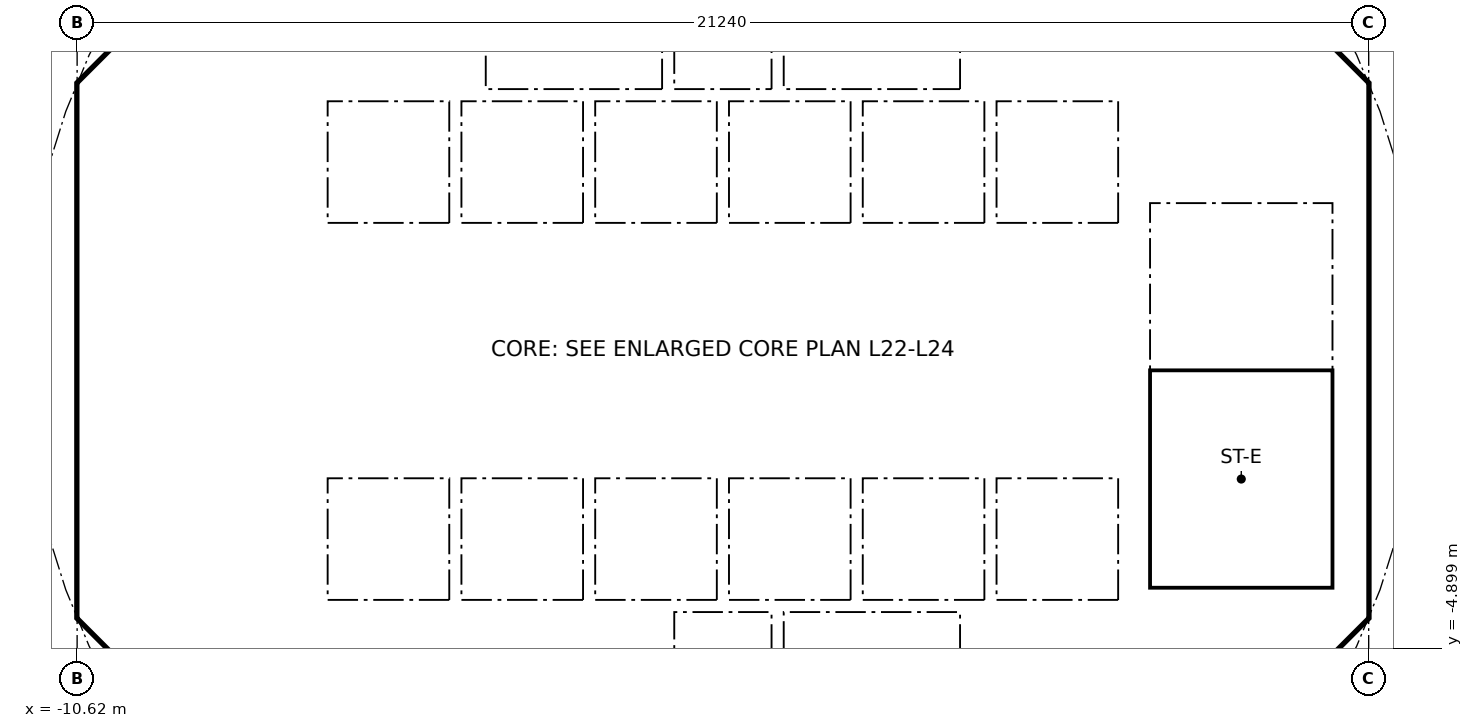
"""IFC4 building model, lengths in metres.
Left out: names, types, materials, properties, quantities, classifications, styles, units other than length and angle.
Written with IfcOpenShell. Run it as: python <this file> out.ifc"""

import sys

from ifc_helpers import new_model, si_unit, direction, frame, frame_2d, origin, place, context, subcontext, project, spatial, polyline, rectangle, outline, extrude, element, fill, save


model = new_model("IFC4")
c1 = context("Model", 3, precision=1e-05, world=origin(), true_north=direction((0.0, 1.0)))
c2 = subcontext(c1, "Body", "Model", "MODEL_VIEW")
j1 = project(units=[si_unit("LENGTHUNIT", "METRE"), si_unit("PLANEANGLEUNIT", "RADIAN")], contexts=[c1])
p1 = place(None, origin())
s1 = spatial("IfcSite", under=j1, at=p1, CompositionType="ELEMENT")
p2 = place(p1, origin())
s2 = spatial("IfcBuilding", under=s1, at=p2, CompositionType="ELEMENT")
p3 = place(p2, frame((0.0, 0.0, 91.8)))
s3 = spatial("IfcBuildingStorey", under=s2, at=p3, CompositionType="ELEMENT", Elevation=91.8)
p4 = place(p3, frame((9.988, 4.613, 0.0), z_axis=(0.0, 0.0, 1.0), x_axis=(-0.707106781187, 0.707106781187, 0.0)))
e1 = element("IfcWall", 1, at=p4, inside=s3, PredefinedType="SHEAR", context=c2, shape_type="SweptSolid", body=[
    extrude(rectangle(XDim=7.602, YDim=0.6, at=frame_2d((3.801, 0.0))), origin(), (0.0, 0.0, 1.0), 3.44),
])
p5 = place(p4, frame((3.201, 0.0, 0.0)))
e2 = element("IfcOpeningElement", 2, at=p5, cuts=e1, PredefinedType="OPENING", context=c2, shape_type="SweptSolid", body=[
    extrude(rectangle(XDim=1.2, YDim=2.1, at=frame_2d((0.6, 1.05))), frame((0.0, 0.31, 0.0), z_axis=(0.0, -1.0, 0.0), x_axis=(1.0, 0.0, 0.0)), (0.0, 0.0, 1.0), 0.62),
])
p6 = place(p3, frame((-4.613, 9.988, 0.0), z_axis=(0.0, 0.0, 1.0), x_axis=(-0.707106781187, -0.707106781187, 0.0)))
e3 = element("IfcWall", 3, at=p6, inside=s3, PredefinedType="SHEAR", context=c2, shape_type="SweptSolid", body=[
    extrude(rectangle(XDim=7.602, YDim=0.6, at=frame_2d((3.801, 0.0))), origin(), (0.0, 0.0, 1.0), 3.44),
])
p7 = place(p6, frame((0.351, 0.0, 0.0)))
e4 = element("IfcOpeningElement", 4, at=p7, cuts=e3, PredefinedType="OPENING", context=c2, shape_type="SweptSolid", body=[
    extrude(rectangle(XDim=1.1, YDim=2.1, at=frame_2d((0.55, 1.05))), frame((0.0, 0.31, 0.0), z_axis=(0.0, -1.0, 0.0), x_axis=(1.0, 0.0, 0.0)), (0.0, 0.0, 1.0), 0.62),
])
p8 = place(p3, frame((-10.325, 3.801, 0.0), z_axis=(0.0, 0.0, 1.0), x_axis=(0.0, -1.0, 0.0)))
e5 = element("IfcWall", 5, at=p8, inside=s3, PredefinedType="SHEAR", context=c2, shape_type="SweptSolid", body=[
    extrude(rectangle(XDim=7.602, YDim=0.6, at=frame_2d((3.801, 0.0))), origin(), (0.0, 0.0, 1.0), 3.44),
])
p9 = place(p8, frame((0.651, 0.0, 0.0)))
e6 = element("IfcOpeningElement", 6, at=p9, cuts=e5, PredefinedType="OPENING", context=c2, shape_type="SweptSolid", body=[
    extrude(rectangle(XDim=1.5, YDim=2.1, at=frame_2d((0.75, 1.05))), frame((0.0, 0.31, 0.0), z_axis=(0.0, -1.0, 0.0), x_axis=(1.0, 0.0, 0.0)), (0.0, 0.0, 1.0), 0.62),
])
p10 = place(p8, frame((5.451, 0.0, 0.0)))
e7 = element("IfcOpeningElement", 7, at=p10, cuts=e5, PredefinedType="OPENING", context=c2, shape_type="SweptSolid", body=[
    extrude(rectangle(XDim=1.5, YDim=2.1, at=frame_2d((0.75, 1.05))), frame((0.0, 0.31, 0.0), z_axis=(0.0, -1.0, 0.0), x_axis=(1.0, 0.0, 0.0)), (0.0, 0.0, 1.0), 0.62),
])
p11 = place(p3, frame((-9.988, -4.613, 0.0), z_axis=(0.0, 0.0, 1.0), x_axis=(0.707106781187, -0.707106781187, 0.0)))
e8 = element("IfcWall", 8, at=p11, inside=s3, PredefinedType="SHEAR", context=c2, shape_type="SweptSolid", body=[
    extrude(rectangle(XDim=7.602, YDim=0.6, at=frame_2d((3.801, 0.0))), origin(), (0.0, 0.0, 1.0), 3.44),
])
p12 = place(p11, frame((6.151, 0.0, 0.0)))
e9 = element("IfcOpeningElement", 9, at=p12, cuts=e8, PredefinedType="OPENING", context=c2, shape_type="SweptSolid", body=[
    extrude(rectangle(XDim=1.1, YDim=2.1, at=frame_2d((0.55, 1.05))), frame((0.0, 0.31, 0.0), z_axis=(0.0, -1.0, 0.0), x_axis=(1.0, 0.0, 0.0)), (0.0, 0.0, 1.0), 0.62),
])
p13 = place(p3, frame((4.613, -9.988, 0.0), z_axis=(0.0, 0.0, 1.0), x_axis=(0.707106781187, 0.707106781187, 0.0)))
e10 = element("IfcWall", 10, at=p13, inside=s3, PredefinedType="SHEAR", context=c2, shape_type="SweptSolid", body=[
    extrude(rectangle(XDim=7.602, YDim=0.6, at=frame_2d((3.801, 0.0))), origin(), (0.0, 0.0, 1.0), 3.44),
])
p14 = place(p13, frame((3.201, 0.0, 0.0)))
e11 = element("IfcOpeningElement", 11, at=p14, cuts=e10, PredefinedType="OPENING", context=c2, shape_type="SweptSolid", body=[
    extrude(rectangle(XDim=1.2, YDim=2.1, at=frame_2d((0.6, 1.05))), frame((0.0, 0.31, 0.0), z_axis=(0.0, -1.0, 0.0), x_axis=(1.0, 0.0, 0.0)), (0.0, 0.0, 1.0), 0.62),
])
p15 = place(p3, frame((-7.0, 4.1, 0.0), z_axis=(0.0, 0.0, 1.0), x_axis=(0.0, 1.0, 0.0)))
e12 = element("IfcWall", 12, at=p15, inside=s3, PredefinedType="PARTITIONING", context=c2, shape_type="SweptSolid", body=[
    extrude(rectangle(XDim=2.927, YDim=0.15, at=frame_2d((1.463, 0.0))), origin(), (0.0, 0.0, 1.0), 3.44),
])
p16 = place(p15, frame((1.051, 0.0, 0.0)))
e13 = element("IfcOpeningElement", 13, at=p16, cuts=e12, PredefinedType="OPENING", context=c2, shape_type="SweptSolid", body=[
    extrude(rectangle(XDim=0.9, YDim=2.1, at=frame_2d((0.45, 1.05))), frame((0.0, 0.085, 0.0), z_axis=(0.0, -1.0, 0.0), x_axis=(1.0, 0.0, 0.0)), (0.0, 0.0, 1.0), 0.17),
])
p17 = place(p3, frame((4.0, 4.3, 0.0), z_axis=(0.0, 0.0, 1.0), x_axis=(0.0, 1.0, 0.0)))
e14 = element("IfcWall", 14, at=p17, inside=s3, PredefinedType="SOLIDWALL", context=c2, shape_type="SweptSolid", body=[
    extrude(rectangle(XDim=2.2, YDim=0.2, at=frame_2d((1.1, 0.0))), origin(), (0.0, 0.0, 1.0), 3.44),
])
p18 = place(p17, frame((0.55, 0.0, 0.0)))
e15 = element("IfcOpeningElement", 15, at=p18, cuts=e14, PredefinedType="OPENING", context=c2, shape_type="SweptSolid", body=[
    extrude(rectangle(XDim=1.1, YDim=2.1, at=frame_2d((0.55, 1.05))), frame((0.0, 0.11, 0.0), z_axis=(0.0, -1.0, 0.0), x_axis=(1.0, 0.0, 0.0)), (0.0, 0.0, 1.0), 0.22),
])
p19 = place(p3, frame((-4.0, 4.3, 0.0), z_axis=(0.0, 0.0, 1.0), x_axis=(0.0, 1.0, 0.0)))
e16 = element("IfcWall", 16, at=p19, inside=s3, PredefinedType="SOLIDWALL", context=c2, shape_type="SweptSolid", body=[
    extrude(rectangle(XDim=2.2, YDim=0.2, at=frame_2d((1.1, 0.0))), origin(), (0.0, 0.0, 1.0), 3.44),
])
p20 = place(p19, frame((0.55, 0.0, 0.0)))
e17 = element("IfcOpeningElement", 17, at=p20, cuts=e16, PredefinedType="OPENING", context=c2, shape_type="SweptSolid", body=[
    extrude(rectangle(XDim=1.1, YDim=2.1, at=frame_2d((0.55, 1.05))), frame((0.0, 0.11, 0.0), z_axis=(0.0, -1.0, 0.0), x_axis=(1.0, 0.0, 0.0)), (0.0, 0.0, 1.0), 0.22),
])
p21 = place(p3, frame((-6.7, 2.0, 0.0), z_axis=(0.0, 0.0, 1.0), x_axis=(1.0, 0.0, 0.0)))
e18 = element("IfcWall", 18, at=p21, inside=s3, PredefinedType="SOLIDWALL", context=c2, shape_type="SweptSolid", body=[
    extrude(rectangle(XDim=13.4, YDim=0.2, at=frame_2d((6.7, 0.0))), origin(), (0.0, 0.0, 1.0), 3.44),
])
p22 = place(p21, frame((0.65, 0.0, 0.0)))
e19 = element("IfcOpeningElement", 19, at=p22, cuts=e18, PredefinedType="OPENING", context=c2, shape_type="SweptSolid", body=[
    extrude(rectangle(XDim=1.1, YDim=2.1, at=frame_2d((0.55, 1.05))), frame((0.0, 0.11, 0.0), z_axis=(0.0, -1.0, 0.0), x_axis=(1.0, 0.0, 0.0)), (0.0, 0.0, 1.0), 0.22),
])
p23 = place(p21, frame((2.85, 0.0, 0.0)))
e20 = element("IfcOpeningElement", 20, at=p23, cuts=e18, PredefinedType="OPENING", context=c2, shape_type="SweptSolid", body=[
    extrude(rectangle(XDim=1.1, YDim=2.1, at=frame_2d((0.55, 1.05))), frame((0.0, 0.11, 0.0), z_axis=(0.0, -1.0, 0.0), x_axis=(1.0, 0.0, 0.0)), (0.0, 0.0, 1.0), 0.22),
])
p24 = place(p21, frame((5.05, 0.0, 0.0)))
e21 = element("IfcOpeningElement", 21, at=p24, cuts=e18, PredefinedType="OPENING", context=c2, shape_type="SweptSolid", body=[
    extrude(rectangle(XDim=1.1, YDim=2.1, at=frame_2d((0.55, 1.05))), frame((0.0, 0.11, 0.0), z_axis=(0.0, -1.0, 0.0), x_axis=(1.0, 0.0, 0.0)), (0.0, 0.0, 1.0), 0.22),
])
p25 = place(p3, frame((6.7, 4.0, 0.0), z_axis=(0.0, 0.0, 1.0), x_axis=(1.0, 0.0, 0.0)))
e22 = element("IfcWall", 22, at=p25, inside=s3, PredefinedType="SOLIDWALL", context=c2, shape_type="SweptSolid", body=[
    extrude(rectangle(XDim=3.325, YDim=0.2, at=frame_2d((1.662, 0.0))), origin(), (0.0, 0.0, 1.0), 3.44),
])
p26 = place(p25, frame((1.25, 0.0, 0.0)))
e23 = element("IfcOpeningElement", 23, at=p26, cuts=e22, PredefinedType="OPENING", context=c2, shape_type="SweptSolid", body=[
    extrude(rectangle(XDim=1.1, YDim=2.1, at=frame_2d((0.55, 1.05))), frame((0.0, 0.11, 0.0), z_axis=(0.0, -1.0, 0.0), x_axis=(1.0, 0.0, 0.0)), (0.0, 0.0, 1.0), 0.22),
])
p27 = place(p3, frame((-7.4, -6.627, 0.0), z_axis=(0.0, 0.0, 1.0), x_axis=(0.0, 1.0, 0.0)))
e24 = element("IfcWall", 24, at=p27, inside=s3, PredefinedType="PARTITIONING", context=c2, shape_type="SweptSolid", body=[
    extrude(rectangle(XDim=2.527, YDim=0.15, at=frame_2d((1.263, 0.0))), origin(), (0.0, 0.0, 1.0), 3.44),
])
p28 = place(p27, frame((0.776, 0.0, 0.0)))
e25 = element("IfcOpeningElement", 25, at=p28, cuts=e24, PredefinedType="OPENING", context=c2, shape_type="SweptSolid", body=[
    extrude(rectangle(XDim=0.9, YDim=2.1, at=frame_2d((0.45, 1.05))), frame((0.0, 0.085, 0.0), z_axis=(0.0, -1.0, 0.0), x_axis=(1.0, 0.0, 0.0)), (0.0, 0.0, 1.0), 0.17),
])
p29 = place(p3, frame((4.0, -6.5, 0.0), z_axis=(0.0, 0.0, 1.0), x_axis=(0.0, 1.0, 0.0)))
e26 = element("IfcWall", 26, at=p29, inside=s3, PredefinedType="SOLIDWALL", context=c2, shape_type="SweptSolid", body=[
    extrude(rectangle(XDim=2.2, YDim=0.2, at=frame_2d((1.1, 0.0))), origin(), (0.0, 0.0, 1.0), 3.44),
])
p30 = place(p29, frame((0.55, 0.0, 0.0)))
e27 = element("IfcOpeningElement", 27, at=p30, cuts=e26, PredefinedType="OPENING", context=c2, shape_type="SweptSolid", body=[
    extrude(rectangle(XDim=1.1, YDim=2.1, at=frame_2d((0.55, 1.05))), frame((0.0, 0.11, 0.0), z_axis=(0.0, -1.0, 0.0), x_axis=(1.0, 0.0, 0.0)), (0.0, 0.0, 1.0), 0.22),
])
p31 = place(p3, frame((-4.0, -6.5, 0.0), z_axis=(0.0, 0.0, 1.0), x_axis=(0.0, 1.0, 0.0)))
e28 = element("IfcWall", 28, at=p31, inside=s3, PredefinedType="SOLIDWALL", context=c2, shape_type="SweptSolid", body=[
    extrude(rectangle(XDim=2.2, YDim=0.2, at=frame_2d((1.1, 0.0))), origin(), (0.0, 0.0, 1.0), 3.44),
])
p32 = place(p31, frame((0.65, 0.0, 0.0)))
e29 = element("IfcOpeningElement", 29, at=p32, cuts=e28, PredefinedType="OPENING", context=c2, shape_type="SweptSolid", body=[
    extrude(rectangle(XDim=0.9, YDim=2.1, at=frame_2d((0.45, 1.05))), frame((0.0, 0.11, 0.0), z_axis=(0.0, -1.0, 0.0), x_axis=(1.0, 0.0, 0.0)), (0.0, 0.0, 1.0), 0.22),
])
p33 = place(p3, frame((-6.7, -2.0, 0.0), z_axis=(0.0, 0.0, 1.0), x_axis=(1.0, 0.0, 0.0)))
e30 = element("IfcWall", 30, at=p33, inside=s3, PredefinedType="SOLIDWALL", context=c2, shape_type="SweptSolid", body=[
    extrude(rectangle(XDim=13.4, YDim=0.2, at=frame_2d((6.7, 0.0))), origin(), (0.0, 0.0, 1.0), 3.44),
])
p34 = place(p33, frame((0.65, 0.0, 0.0)))
e31 = element("IfcOpeningElement", 31, at=p34, cuts=e30, PredefinedType="OPENING", context=c2, shape_type="SweptSolid", body=[
    extrude(rectangle(XDim=1.1, YDim=2.1, at=frame_2d((0.55, 1.05))), frame((0.0, 0.11, 0.0), z_axis=(0.0, -1.0, 0.0), x_axis=(1.0, 0.0, 0.0)), (0.0, 0.0, 1.0), 0.22),
])
p35 = place(p33, frame((2.85, 0.0, 0.0)))
e32 = element("IfcOpeningElement", 32, at=p35, cuts=e30, PredefinedType="OPENING", context=c2, shape_type="SweptSolid", body=[
    extrude(rectangle(XDim=1.1, YDim=2.1, at=frame_2d((0.55, 1.05))), frame((0.0, 0.11, 0.0), z_axis=(0.0, -1.0, 0.0), x_axis=(1.0, 0.0, 0.0)), (0.0, 0.0, 1.0), 0.22),
])
p36 = place(p3, origin())
e33 = element("IfcWall", 33, at=p36, inside=s3, PredefinedType="SHEAR", context=c2, shape_type="SweptSolid", body=[
    extrude(outline(polyline([(-10.625, -3.801), (-10.025, -3.801), (-10.025, -4.152), (-9.776, -4.401), (-10.2, -4.825), (-10.625, -4.401), (-10.625, -3.801)])), origin(), (0.0, 0.0, 1.0), 3.44),
])
p37 = place(p3, origin())
e34 = element("IfcWall", 34, at=p37, inside=s3, PredefinedType="SHEAR", context=c2, shape_type="SweptSolid", body=[
    extrude(outline(polyline([(-10.2, 4.825), (-9.776, 4.401), (-10.025, 4.152), (-10.025, 3.801), (-10.625, 3.801), (-10.625, 4.401), (-10.2, 4.825)])), origin(), (0.0, 0.0, 1.0), 3.44),
])
p38 = place(p3, origin())
e35 = element("IfcWall", 35, at=p38, inside=s3, PredefinedType="SHEAR", context=c2, shape_type="SweptSolid", body=[
    extrude(outline(polyline([(9.776, -4.401), (10.025, -4.152), (10.025, -3.801), (10.025, 4.152), (9.776, 4.401), (10.2, 4.825), (10.625, 4.401), (10.625, -4.401), (10.2, -4.825), (9.776, -4.401)])), origin(), (0.0, 0.0, 1.0), 3.44),
])
for number, where, z_axis, x_axis in (
    (36, (-0.9, -6.5, 0.0), (0.0, 0.0, 1.0), (0.0, 1.0, 0.0)),
    (37, (0.9, -6.5, 0.0), (0.0, 0.0, 1.0), (0.0, 1.0, 0.0)),
):
    element("IfcWall", number, at=place(p3, frame(where, z_axis=z_axis, x_axis=x_axis)), inside=s3, PredefinedType="SOLIDWALL", context=c2, shape_type="SweptSolid", body=[
        extrude(rectangle(XDim=2.2, YDim=0.2, at=frame_2d((1.1, 0.0))), origin(), (0.0, 0.0, 1.0), 3.44),
    ])
p39 = place(p3, origin())
e38 = element("IfcWall", 38, at=p39, inside=s3, PredefinedType="SOLIDWALL", context=c2, shape_type="SweptSolid", body=[
    extrude(outline(polyline([(-6.7, -2.1), (-6.5, -2.1), (-6.5, -4.1), (-4.5, -4.1), (-4.5, -2.1), (-4.3, -2.1), (-4.3, -4.1), (-2.3, -4.1), (-2.3, -2.1), (-2.1, -2.1), (-2.1, -4.1), (-0.1, -4.1), (-0.1, -2.1), (0.1, -2.1), (0.1, -4.1), (2.1, -4.1), (2.1, -2.1), (2.3, -2.1), (2.3, -4.1), (4.3, -4.1), (4.3, -2.1), (4.5, -2.1), (4.5, -4.1), (6.5, -4.1), (6.5, -2.1), (6.7, -2.1), (6.7, -4.3), (-6.7, -4.3), (-6.7, -2.1)])), origin(), (0.0, 0.0, 1.0), 3.44),
])
for number, where, z_axis, x_axis in (
    (39, (-0.9, 4.3, 0.0), (0.0, 0.0, 1.0), (0.0, 1.0, 0.0)),
    (40, (0.9, 4.3, 0.0), (0.0, 0.0, 1.0), (0.0, 1.0, 0.0)),
):
    element("IfcWall", number, at=place(p3, frame(where, z_axis=z_axis, x_axis=x_axis)), inside=s3, PredefinedType="SOLIDWALL", context=c2, shape_type="SweptSolid", body=[
        extrude(rectangle(XDim=2.2, YDim=0.2, at=frame_2d((1.1, 0.0))), origin(), (0.0, 0.0, 1.0), 3.44),
    ])
p40 = place(p3, origin())
e41 = element("IfcWall", 41, at=p40, inside=s3, PredefinedType="SOLIDWALL", context=c2, shape_type="SweptSolid", body=[
    extrude(outline(polyline([(-6.5, 2.1), (-6.7, 2.1), (-6.7, 4.3), (6.7, 4.3), (6.7, 2.1), (6.5, 2.1), (6.5, 4.1), (4.5, 4.1), (4.5, 2.1), (4.3, 2.1), (4.3, 4.1), (2.3, 4.1), (2.3, 2.1), (2.1, 2.1), (2.1, 4.1), (0.1, 4.1), (0.1, 2.1), (-0.1, 2.1), (-0.1, 4.1), (-2.1, 4.1), (-2.1, 2.1), (-2.3, 2.1), (-2.3, 4.1), (-4.3, 4.1), (-4.3, 2.1), (-4.5, 2.1), (-4.5, 4.1), (-6.5, 4.1), (-6.5, 2.1)])), origin(), (0.0, 0.0, 1.0), 3.44),
])
for number, where, z_axis, x_axis in (
    (42, (-10.025, -4.0, 0.0), (0.0, 0.0, 1.0), (1.0, 0.0, 0.0)),
    (43, (-10.025, 4.0, 0.0), (0.0, 0.0, 1.0), (1.0, 0.0, 0.0)),
):
    element("IfcWall", number, at=place(p3, frame(where, z_axis=z_axis, x_axis=x_axis)), inside=s3, PredefinedType="PARTITIONING", context=c2, shape_type="SweptSolid", body=[
        extrude(rectangle(XDim=3.325, YDim=0.2, at=frame_2d((1.662, 0.0))), origin(), (0.0, 0.0, 1.0), 3.44),
    ])
p41 = place(p3, origin())
e44 = element("IfcWall", 44, at=p41, inside=s3, PredefinedType="SOLIDWALL", context=c2, shape_type="SweptSolid", body=[
    extrude(outline(polyline([(7.025, -3.9), (6.7, -3.9), (6.7, 3.9), (7.025, 3.9), (7.025, -3.9)])), origin(), (0.0, 0.0, 1.0), 3.44),
])
p42 = place(p3, origin())
e45 = element("IfcWall", 45, at=p42, inside=s3, PredefinedType="SOLIDWALL", context=c2, shape_type="SweptSolid", body=[
    extrude(outline(polyline([(10.025, -4.1), (6.7, -4.1), (6.7, -3.9), (10.025, -3.9), (10.025, -4.1)])), origin(), (0.0, 0.0, 1.0), 3.44),
])
p43 = place(p22, origin())
e46 = element("IfcDoor", 46, at=p43, inside=s3, OperationType="DOUBLE_DOOR_SLIDING", PredefinedType="DOOR", context=c2, shape_type="SweptSolid", body=[
    extrude(rectangle(XDim=1.1, YDim=2.1, at=frame_2d((0.55, 1.05))), frame((0.0, 0.025, 0.0), z_axis=(0.0, -1.0, 0.0), x_axis=(1.0, 0.0, 0.0)), (0.0, 0.0, 1.0), 0.05),
])
fill(e19, e46)
p44 = place(p23, origin())
e47 = element("IfcDoor", 47, at=p44, inside=s3, OperationType="DOUBLE_DOOR_SLIDING", PredefinedType="DOOR", context=c2, shape_type="SweptSolid", body=[
    extrude(rectangle(XDim=1.1, YDim=2.1, at=frame_2d((0.55, 1.05))), frame((0.0, 0.025, 0.0), z_axis=(0.0, -1.0, 0.0), x_axis=(1.0, 0.0, 0.0)), (0.0, 0.0, 1.0), 0.05),
])
fill(e20, e47)
p45 = place(p24, origin())
e48 = element("IfcDoor", 48, at=p45, inside=s3, OperationType="DOUBLE_DOOR_SLIDING", PredefinedType="DOOR", context=c2, shape_type="SweptSolid", body=[
    extrude(rectangle(XDim=1.1, YDim=2.1, at=frame_2d((0.55, 1.05))), frame((0.0, 0.025, 0.0), z_axis=(0.0, -1.0, 0.0), x_axis=(1.0, 0.0, 0.0)), (0.0, 0.0, 1.0), 0.05),
])
fill(e21, e48)
p46 = place(p34, origin())
e49 = element("IfcDoor", 49, at=p46, inside=s3, OperationType="DOUBLE_DOOR_SLIDING", PredefinedType="DOOR", context=c2, shape_type="SweptSolid", body=[
    extrude(rectangle(XDim=1.1, YDim=2.1, at=frame_2d((0.55, 1.05))), frame((0.0, 0.025, 0.0), z_axis=(0.0, -1.0, 0.0), x_axis=(1.0, 0.0, 0.0)), (0.0, 0.0, 1.0), 0.05),
])
fill(e31, e49)
p47 = place(p35, origin())
e50 = element("IfcDoor", 50, at=p47, inside=s3, OperationType="DOUBLE_DOOR_SLIDING", PredefinedType="DOOR", context=c2, shape_type="SweptSolid", body=[
    extrude(rectangle(XDim=1.1, YDim=2.1, at=frame_2d((0.55, 1.05))), frame((0.0, 0.025, 0.0), z_axis=(0.0, -1.0, 0.0), x_axis=(1.0, 0.0, 0.0)), (0.0, 0.0, 1.0), 0.05),
])
fill(e32, e50)
p48 = place(p18, origin())
e51 = element("IfcDoor", 51, at=p48, inside=s3, OperationType="DOUBLE_DOOR_SLIDING", PredefinedType="DOOR", context=c2, shape_type="SweptSolid", body=[
    extrude(rectangle(XDim=1.1, YDim=2.1, at=frame_2d((0.55, 1.05))), frame((0.0, 0.025, 0.0), z_axis=(0.0, -1.0, 0.0), x_axis=(1.0, 0.0, 0.0)), (0.0, 0.0, 1.0), 0.05),
])
fill(e15, e51)
p49 = place(p30, origin())
e52 = element("IfcDoor", 52, at=p49, inside=s3, OperationType="DOUBLE_DOOR_SLIDING", PredefinedType="DOOR", context=c2, shape_type="SweptSolid", body=[
    extrude(rectangle(XDim=1.1, YDim=2.1, at=frame_2d((0.55, 1.05))), frame((0.0, 0.025, 0.0), z_axis=(0.0, -1.0, 0.0), x_axis=(1.0, 0.0, 0.0)), (0.0, 0.0, 1.0), 0.05),
])
fill(e27, e52)
p50 = place(p20, origin())
e53 = element("IfcDoor", 53, at=p50, inside=s3, OperationType="DOUBLE_DOOR_SLIDING", PredefinedType="DOOR", context=c2, shape_type="SweptSolid", body=[
    extrude(rectangle(XDim=1.1, YDim=2.1, at=frame_2d((0.55, 1.05))), frame((0.0, 0.025, 0.0), z_axis=(0.0, -1.0, 0.0), x_axis=(1.0, 0.0, 0.0)), (0.0, 0.0, 1.0), 0.05),
])
fill(e17, e53)
p51 = place(p26, frame((1.1, 0.0, 0.0), x_axis=(-1.0, 0.0, 0.0)))
e54 = element("IfcDoor", 54, at=p51, inside=s3, OperationType="SINGLE_SWING_RIGHT", PredefinedType="DOOR", context=c2, shape_type="SweptSolid", body=[
    extrude(rectangle(XDim=1.1, YDim=2.1, at=frame_2d((0.55, 1.05))), frame((0.0, 0.025, 0.0), z_axis=(0.0, -1.0, 0.0), x_axis=(1.0, 0.0, 0.0)), (0.0, 0.0, 1.0), 0.05),
])
fill(e23, e54)
p52 = place(p9, origin())
e55 = element("IfcDoor", 55, at=p52, inside=s3, OperationType="DOUBLE_DOOR_SINGLE_SWING", PredefinedType="DOOR", context=c2, shape_type="SweptSolid", body=[
    extrude(rectangle(XDim=1.5, YDim=2.1, at=frame_2d((0.75, 1.05))), frame((0.0, 0.025, 0.0), z_axis=(0.0, -1.0, 0.0), x_axis=(1.0, 0.0, 0.0)), (0.0, 0.0, 1.0), 0.05),
])
fill(e6, e55)
p53 = place(p10, origin())
e56 = element("IfcDoor", 56, at=p53, inside=s3, OperationType="DOUBLE_DOOR_SINGLE_SWING", PredefinedType="DOOR", context=c2, shape_type="SweptSolid", body=[
    extrude(rectangle(XDim=1.5, YDim=2.1, at=frame_2d((0.75, 1.05))), frame((0.0, 0.025, 0.0), z_axis=(0.0, -1.0, 0.0), x_axis=(1.0, 0.0, 0.0)), (0.0, 0.0, 1.0), 0.05),
])
fill(e7, e56)
save(model, sys.argv[1])
